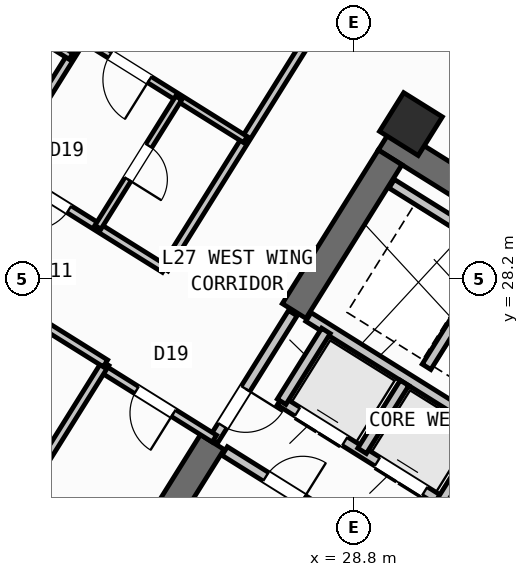
"""IFC4 building model, lengths in metres.
Left out: names, types, materials, properties, quantities, classifications, styles, units other than length and angle.
Written with IfcOpenShell. Run it as: python <this file> out.ifc"""

import sys

from ifc_helpers import new_model, si_unit, direction, frame, frame_2d, origin, origin_2d, place, context, subcontext, project, spatial, rectangle, hollow_rectangle, extrude, source, transform, mapped, element, fill, save


model = new_model("IFC4")
c1 = context("Model", 3, precision=1e-05, world=origin(), true_north=direction((0.0, 1.0)))
c2 = subcontext(c1, "Body", "Model", "MODEL_VIEW")
j1 = project(units=[si_unit("LENGTHUNIT", "METRE"), si_unit("PLANEANGLEUNIT", "RADIAN")], contexts=[c1])
p1 = place(None, origin())
s1 = spatial("IfcSite", under=j1, at=p1, CompositionType="ELEMENT")
p2 = place(p1, origin())
s2 = spatial("IfcBuilding", under=s1, at=p2, CompositionType="ELEMENT")
p3 = place(p2, frame((0.0, 0.0, 108.9)))
s3 = spatial("IfcBuildingStorey", under=s2, at=p3, CompositionType="ELEMENT", Elevation=108.9)
p4 = place(p3, frame((40.573, 24.01, 0.0), z_axis=(0.0, 0.0, 1.0), x_axis=(-0.848047359947, 0.529920442413, 0.0)))
e1 = element("IfcWall", 1, at=p4, inside=s3, PredefinedType="SHEAR", context=c2, shape_type="SweptSolid", body=[
    extrude(rectangle(XDim=13.14, YDim=0.55, at=frame_2d((6.57, 0.0))), origin(), (0.0, 0.0, 1.0), 3.35),
])
p5 = place(p3, frame((29.517, 30.594, 0.0), z_axis=(0.0, 0.0, 1.0), x_axis=(-0.529906864564, -0.848055844204, 0.0)))
e2 = element("IfcWall", 2, at=p5, inside=s3, PredefinedType="SHEAR", context=c2, shape_type="SweptSolid", body=[
    extrude(rectangle(XDim=3.575, YDim=0.55, at=frame_2d((1.788, 0.0))), origin(), (0.0, 0.0, 1.0), 3.35),
])
p6 = place(p3, frame((26.007, 24.976, 0.0), z_axis=(0.0, 0.0, 1.0), x_axis=(-0.529923795287, -0.848045264823, 0.0)))
e3 = element("IfcWall", 3, at=p6, inside=s3, PredefinedType="SHEAR", context=c2, shape_type="SweptSolid", body=[
    extrude(rectangle(XDim=6.425, YDim=0.55, at=frame_2d((3.212, 0.0))), origin(), (0.0, 0.0, 1.0), 3.35),
])
m1 = source(origin(), c2, "Body", "SweptSolid", [
    extrude(hollow_rectangle(XDim=0.9, YDim=0.9, WallThickness=0.036, at=origin_2d()), origin(), (0.0, 0.0, 1.0), 3.6),
])
p7 = place(p3, frame((29.928, 31.251, 0.0), z_axis=(0.0, 0.0, 1.0), x_axis=(-0.848048096156, 0.529919264233, 0.0)))
e4 = element("IfcColumn", 4, at=p7, inside=s3, PredefinedType="COLUMN", context=c2, shape_type="MappedRepresentation", body=[
    mapped(m1, transform((0.0, 0.0, 0.0), scale=1.0)),
])
p8 = place(p3, frame((31.76, 12.183, 0.0), z_axis=(0.0, 0.0, 1.0), x_axis=(-0.848047074256, 0.529920899612, 0.0)))
e5 = element("IfcWall", 5, at=p8, inside=s3, PredefinedType="STANDARD", context=c2, shape_type="SweptSolid", body=[
    extrude(rectangle(XDim=30.652, YDim=0.32, at=frame_2d((15.326, 0.0))), origin(), (0.0, 0.0, 1.0), 3.35),
])
p9 = place(p8, frame((15.153, 0.0, 0.0)))
e6 = element("IfcOpeningElement", 6, at=p9, cuts=e5, PredefinedType="OPENING", context=c2, shape_type="SweptSolid", body=[
    extrude(rectangle(XDim=1.2, YDim=2.15, at=frame_2d((0.6, 1.075))), frame((0.0, 0.17, 0.0), z_axis=(0.0, -1.0, 0.0), x_axis=(1.0, 0.0, 0.0)), (0.0, 0.0, 1.0), 0.34),
])
p10 = place(p8, frame((2.002, 0.0, 0.8)))
e7 = element("IfcOpeningElement", 7, at=p10, cuts=e5, PredefinedType="OPENING", context=c2, shape_type="SweptSolid", body=[
    extrude(rectangle(XDim=2.1, YDim=1.55, at=frame_2d((1.05, 0.775))), frame((0.0, 0.17, 0.0), z_axis=(0.0, -1.0, 0.0), x_axis=(1.0, 0.0, 0.0)), (0.0, 0.0, 1.0), 0.34),
])
p11 = place(p8, frame((7.206, 0.0, 0.8)))
e8 = element("IfcOpeningElement", 8, at=p11, cuts=e5, PredefinedType="OPENING", context=c2, shape_type="SweptSolid", body=[
    extrude(rectangle(XDim=2.1, YDim=1.55, at=frame_2d((1.05, 0.775))), frame((0.0, 0.17, 0.0), z_axis=(0.0, -1.0, 0.0), x_axis=(1.0, 0.0, 0.0)), (0.0, 0.0, 1.0), 0.34),
])
p12 = place(p8, frame((12.648, 0.0, 1.0)))
e9 = element("IfcOpeningElement", 9, at=p12, cuts=e5, PredefinedType="OPENING", context=c2, shape_type="SweptSolid", body=[
    extrude(rectangle(XDim=0.9, YDim=1.25, at=frame_2d((0.45, 0.625))), frame((0.0, 0.17, 0.0), z_axis=(0.0, -1.0, 0.0), x_axis=(1.0, 0.0, 0.0)), (0.0, 0.0, 1.0), 0.34),
])
p13 = place(p8, frame((19.59, 0.0, 0.95)))
e10 = element("IfcOpeningElement", 10, at=p13, cuts=e5, PredefinedType="OPENING", context=c2, shape_type="SweptSolid", body=[
    extrude(rectangle(XDim=1.2, YDim=1.4, at=frame_2d((0.6, 0.7))), frame((0.0, 0.17, 0.0), z_axis=(0.0, -1.0, 0.0), x_axis=(1.0, 0.0, 0.0)), (0.0, 0.0, 1.0), 0.34),
])
p14 = place(p8, frame((25.966, 0.0, 1.0)))
e11 = element("IfcOpeningElement", 11, at=p14, cuts=e5, PredefinedType="OPENING", context=c2, shape_type="SweptSolid", body=[
    extrude(rectangle(XDim=0.9, YDim=1.25, at=frame_2d((0.45, 0.625))), frame((0.0, 0.17, 0.0), z_axis=(0.0, -1.0, 0.0), x_axis=(1.0, 0.0, 0.0)), (0.0, 0.0, 1.0), 0.34),
])
p15 = place(p8, frame((28.871, 0.0, 1.0)))
e12 = element("IfcOpeningElement", 12, at=p15, cuts=e5, PredefinedType="OPENING", context=c2, shape_type="SweptSolid", body=[
    extrude(rectangle(XDim=0.9, YDim=1.25, at=frame_2d((0.45, 0.625))), frame((0.0, 0.17, 0.0), z_axis=(0.0, -1.0, 0.0), x_axis=(1.0, 0.0, 0.0)), (0.0, 0.0, 1.0), 0.34),
])
p16 = place(p3, frame((17.424, 47.083, 0.0), z_axis=(0.0, 0.0, 1.0), x_axis=(0.848049927979, -0.529916332693, 0.0)))
e13 = element("IfcWall", 13, at=p16, inside=s3, PredefinedType="STANDARD", context=c2, shape_type="SweptSolid", body=[
    extrude(rectangle(XDim=29.223, YDim=0.32, at=frame_2d((14.612, 0.0))), origin(), (0.0, 0.0, 1.0), 3.35),
])
p17 = place(p16, frame((3.77, 0.0, 0.0)))
e14 = element("IfcOpeningElement", 14, at=p17, cuts=e13, PredefinedType="OPENING", context=c2, shape_type="SweptSolid", body=[
    extrude(rectangle(XDim=1.05, YDim=2.15, at=frame_2d((0.525, 1.075))), frame((0.0, 0.17, 0.0), z_axis=(0.0, -1.0, 0.0), x_axis=(1.0, 0.0, 0.0)), (0.0, 0.0, 1.0), 0.34),
])
p18 = place(p16, frame((0.9, 0.0, 0.8)))
e15 = element("IfcOpeningElement", 15, at=p18, cuts=e13, PredefinedType="OPENING", context=c2, shape_type="SweptSolid", body=[
    extrude(rectangle(XDim=2.1, YDim=1.55, at=frame_2d((1.05, 0.775))), frame((0.0, 0.17, 0.0), z_axis=(0.0, -1.0, 0.0), x_axis=(1.0, 0.0, 0.0)), (0.0, 0.0, 1.0), 0.34),
])
p19 = place(p16, frame((6.972, 0.0, 1.0)))
e16 = element("IfcOpeningElement", 16, at=p19, cuts=e13, PredefinedType="OPENING", context=c2, shape_type="SweptSolid", body=[
    extrude(rectangle(XDim=0.9, YDim=1.25, at=frame_2d((0.45, 0.625))), frame((0.0, 0.17, 0.0), z_axis=(0.0, -1.0, 0.0), x_axis=(1.0, 0.0, 0.0)), (0.0, 0.0, 1.0), 0.34),
])
p20 = place(p16, frame((9.847, 0.0, 0.85)))
e17 = element("IfcOpeningElement", 17, at=p20, cuts=e13, PredefinedType="OPENING", context=c2, shape_type="SweptSolid", body=[
    extrude(rectangle(XDim=1.5, YDim=1.5, at=frame_2d((0.75, 0.75))), frame((0.0, 0.17, 0.0), z_axis=(0.0, -1.0, 0.0), x_axis=(1.0, 0.0, 0.0)), (0.0, 0.0, 1.0), 0.34),
])
p21 = place(p16, frame((13.889, 0.0, 0.95)))
e18 = element("IfcOpeningElement", 18, at=p21, cuts=e13, PredefinedType="OPENING", context=c2, shape_type="SweptSolid", body=[
    extrude(rectangle(XDim=1.2, YDim=1.4, at=frame_2d((0.6, 0.7))), frame((0.0, 0.17, 0.0), z_axis=(0.0, -1.0, 0.0), x_axis=(1.0, 0.0, 0.0)), (0.0, 0.0, 1.0), 0.34),
])
p22 = place(p16, frame((17.254, 0.0, 1.0)))
e19 = element("IfcOpeningElement", 19, at=p22, cuts=e13, PredefinedType="OPENING", context=c2, shape_type="SweptSolid", body=[
    extrude(rectangle(XDim=0.9, YDim=1.25, at=frame_2d((0.45, 0.625))), frame((0.0, 0.17, 0.0), z_axis=(0.0, -1.0, 0.0), x_axis=(1.0, 0.0, 0.0)), (0.0, 0.0, 1.0), 0.34),
])
p23 = place(p16, frame((20.764, 0.0, 0.8)))
e20 = element("IfcOpeningElement", 20, at=p23, cuts=e13, PredefinedType="OPENING", context=c2, shape_type="SweptSolid", body=[
    extrude(rectangle(XDim=2.1, YDim=1.55, at=frame_2d((1.05, 0.775))), frame((0.0, 0.17, 0.0), z_axis=(0.0, -1.0, 0.0), x_axis=(1.0, 0.0, 0.0)), (0.0, 0.0, 1.0), 0.34),
])
p24 = place(p16, frame((25.403, 0.0, 0.8)))
e21 = element("IfcOpeningElement", 21, at=p24, cuts=e13, PredefinedType="OPENING", context=c2, shape_type="SweptSolid", body=[
    extrude(rectangle(XDim=2.1, YDim=1.55, at=frame_2d((1.05, 0.775))), frame((0.0, 0.17, 0.0), z_axis=(0.0, -1.0, 0.0), x_axis=(1.0, 0.0, 0.0)), (0.0, 0.0, 1.0), 0.34),
])
p25 = place(p3, frame((31.822, 24.998, 0.0), z_axis=(0.0, 0.0, 1.0), x_axis=(-0.848036912365, 0.52993716162, 0.0)))
e22 = element("IfcWall", 22, at=p25, inside=s3, PredefinedType="STANDARD", context=c2, shape_type="SweptSolid", body=[
    extrude(rectangle(XDim=4.618, YDim=0.2, at=frame_2d((2.309, 0.0))), origin(), (0.0, 0.0, 1.0), 3.34),
])
p26 = place(p3, frame((32.108, 22.814, 0.0), z_axis=(0.0, 0.0, 1.0), x_axis=(-0.848042229521, 0.529928652696, 0.0)))
e23 = element("IfcWall", 23, at=p26, inside=s3, PredefinedType="STANDARD", context=c2, shape_type="SweptSolid", body=[
    extrude(rectangle(XDim=5.62, YDim=0.2, at=frame_2d((2.81, 0.0))), origin(), (0.0, 0.0, 1.0), 3.34),
])
p27 = place(p26, frame((0.39, 0.0, 0.0)))
e24 = element("IfcOpeningElement", 24, at=p27, cuts=e23, PredefinedType="OPENING", context=c2, shape_type="SweptSolid", body=[
    extrude(rectangle(XDim=1.1, YDim=2.15, at=frame_2d((0.55, 1.075))), frame((0.0, 0.11, 0.0), z_axis=(0.0, -1.0, 0.0), x_axis=(1.0, 0.0, 0.0)), (0.0, 0.0, 1.0), 0.22),
])
p28 = place(p26, frame((2.25, 0.0, 0.0)))
e25 = element("IfcOpeningElement", 25, at=p28, cuts=e23, PredefinedType="OPENING", context=c2, shape_type="SweptSolid", body=[
    extrude(rectangle(XDim=1.1, YDim=2.15, at=frame_2d((0.55, 1.075))), frame((0.0, 0.11, 0.0), z_axis=(0.0, -1.0, 0.0), x_axis=(1.0, 0.0, 0.0)), (0.0, 0.0, 1.0), 0.22),
])
p29 = place(p26, frame((4.11, 0.0, 0.0)))
e26 = element("IfcOpeningElement", 26, at=p29, cuts=e23, PredefinedType="OPENING", context=c2, shape_type="SweptSolid", body=[
    extrude(rectangle(XDim=1.1, YDim=2.15, at=frame_2d((0.55, 1.075))), frame((0.0, 0.11, 0.0), z_axis=(0.0, -1.0, 0.0), x_axis=(1.0, 0.0, 0.0)), (0.0, 0.0, 1.0), 0.22),
])
p30 = place(p3, frame((28.25, 27.17, 0.0), z_axis=(0.0, 0.0, 1.0), x_axis=(-0.529905827651, -0.848056492117, 0.0)))
e27 = element("IfcWall", 27, at=p30, inside=s3, PredefinedType="STANDARD", context=c2, shape_type="SweptSolid", body=[
    extrude(rectangle(XDim=1.65, YDim=0.2, at=frame_2d((0.825, 0.0))), origin(), (0.0, 0.0, 1.0), 3.34),
])
p31 = place(p3, frame((31.645, 28.716, 0.0), z_axis=(0.0, 0.0, 1.0), x_axis=(-0.52986693015, -0.848080795876, 0.0)))
e28 = element("IfcWall", 28, at=p31, inside=s3, PredefinedType="STANDARD", context=c2, shape_type="SweptSolid", body=[
    extrude(rectangle(XDim=2.66, YDim=0.2, at=frame_2d((1.33, 0.0))), origin(), (0.0, 0.0, 1.0), 3.34),
])
p32 = place(p3, frame((33.363, 27.69, 0.0), z_axis=(0.0, 0.0, 1.0), x_axis=(-0.848047090064, 0.529920874315, 0.0)))
e29 = element("IfcWall", 29, at=p32, inside=s3, PredefinedType="STANDARD", context=c2, shape_type="SweptSolid", body=[
    extrude(rectangle(XDim=4.498, YDim=0.2, at=frame_2d((2.249, 0.0))), origin(), (0.0, 0.0, 1.0), 3.34),
])
for number, where, z_axis, x_axis in (
    (30, (31.379, 25.156, 0.0), (0.0, 0.0, 1.0), (-0.53, -0.848, 0.0)),
    (31, (29.801, 26.142, 0.0), (0.0, 0.0, 1.0), (-0.53, -0.848, 0.0)),
):
    element("IfcWall", number, at=place(p3, frame(where, z_axis=z_axis, x_axis=x_axis)), inside=s3, PredefinedType="STANDARD", context=c2, shape_type="SweptSolid", body=[
        extrude(rectangle(XDim=1.58, YDim=0.2, at=frame_2d((0.79, 0.0))), origin(), (0.0, 0.0, 1.0), 3.34),
    ])
p33 = place(p3, frame((31.525, 21.504, 0.0), z_axis=(0.0, 0.0, 1.0), x_axis=(-0.848040211232, 0.529931882541, 0.0)))
e32 = element("IfcWall", 32, at=p33, inside=s3, PredefinedType="STANDARD", context=c2, shape_type="SweptSolid", body=[
    extrude(rectangle(XDim=6.218, YDim=0.2, at=frame_2d((3.109, 0.0))), origin(), (0.0, 0.0, 1.0), 3.34),
])
p34 = place(p33, frame((4.4, 0.0, 0.0)))
e33 = element("IfcOpeningElement", 33, at=p34, cuts=e32, PredefinedType="OPENING", context=c2, shape_type="SweptSolid", body=[
    extrude(rectangle(XDim=0.86, YDim=2.05, at=frame_2d((0.43, 1.025))), frame((0.0, 0.11, 0.0), z_axis=(0.0, -1.0, 0.0), x_axis=(1.0, 0.0, 0.0)), (0.0, 0.0, 1.0), 0.22),
])
p35 = place(p33, frame((0.35, 0.0, 0.0)))
e34 = element("IfcOpeningElement", 34, at=p35, cuts=e32, PredefinedType="OPENING", context=c2, shape_type="SweptSolid", body=[
    extrude(rectangle(XDim=0.86, YDim=2.05, at=frame_2d((0.43, 1.025))), frame((0.0, 0.11, 0.0), z_axis=(0.0, -1.0, 0.0), x_axis=(1.0, 0.0, 0.0)), (0.0, 0.0, 1.0), 0.22),
])
p36 = place(p3, frame((27.596, 27.52, 0.0), z_axis=(0.0, 0.0, 1.0), x_axis=(-0.529865479138, -0.848081702443, 0.0)))
e35 = element("IfcWall", 35, at=p36, inside=s3, PredefinedType="STANDARD", context=c2, shape_type="SweptSolid", body=[
    extrude(rectangle(XDim=2.96, YDim=0.2, at=frame_2d((1.48, 0.0))), origin(), (0.0, 0.0, 1.0), 3.34),
])
p37 = place(p36, frame((1.76, 0.0, 0.0)))
e36 = element("IfcOpeningElement", 36, at=p37, cuts=e35, PredefinedType="OPENING", context=c2, shape_type="SweptSolid", body=[
    extrude(rectangle(XDim=0.86, YDim=2.05, at=frame_2d((0.43, 1.025))), frame((0.0, 0.11, 0.0), z_axis=(0.0, -1.0, 0.0), x_axis=(1.0, 0.0, 0.0)), (0.0, 0.0, 1.0), 0.22),
])
p38 = place(p3, frame((26.049, 25.044, 0.0), z_axis=(0.0, 0.0, 1.0), x_axis=(-0.848050851465, 0.529914854792, 0.0)))
e37 = element("IfcWall", 37, at=p38, inside=s3, PredefinedType="PARTITIONING", context=c2, shape_type="SweptSolid", body=[
    extrude(rectangle(XDim=2.61, YDim=0.16, at=frame_2d((1.305, 0.0))), origin(), (0.0, 0.0, 1.0), 2.775),
])
p39 = place(p38, frame((0.95, 0.0, 0.0)))
e38 = element("IfcOpeningElement", 38, at=p39, cuts=e37, PredefinedType="OPENING", context=c2, shape_type="SweptSolid", body=[
    extrude(rectangle(XDim=0.86, YDim=2.05, at=frame_2d((0.43, 1.025))), frame((0.0, 0.09, 0.0), z_axis=(0.0, -1.0, 0.0), x_axis=(1.0, 0.0, 0.0)), (0.0, 0.0, 1.0), 0.18),
])
p40 = place(p3, frame((31.239, 38.274, 0.0), z_axis=(0.0, 0.0, 1.0), x_axis=(-0.529925472745, -0.848044216616, 0.0)))
e39 = element("IfcWall", 39, at=p40, inside=s3, PredefinedType="PARTITIONING", context=c2, shape_type="SweptSolid", body=[
    extrude(rectangle(XDim=11.65, YDim=0.16, at=frame_2d((5.825, 0.0))), origin(), (0.0, 0.0, 1.0), 3.34),
])
p41 = place(p3, frame((23.899, 26.529, 0.0), z_axis=(0.0, 0.0, 1.0), x_axis=(-0.529920662441, -0.848047222457, 0.0)))
e40 = element("IfcWall", 40, at=p41, inside=s3, PredefinedType="PARTITIONING", context=c2, shape_type="SweptSolid", body=[
    extrude(rectangle(XDim=7.85, YDim=0.16, at=frame_2d((3.925, 0.0))), origin(), (0.0, 0.0, 1.0), 3.34),
])
p42 = place(p3, frame((25.065, 28.394, 0.0), z_axis=(0.0, 0.0, 1.0), x_axis=(-0.848048310262, 0.529918921593, 0.0)))
e41 = element("IfcWall", 41, at=p42, inside=s3, PredefinedType="PARTITIONING", context=c2, shape_type="SweptSolid", body=[
    extrude(rectangle(XDim=16.73, YDim=0.16, at=frame_2d((8.365, 0.0))), origin(), (0.0, 0.0, 1.0), 3.34),
])
p43 = place(p42, frame((2.22, 0.0, 0.0)))
e42 = element("IfcOpeningElement", 42, at=p43, cuts=e41, PredefinedType="OPENING", context=c2, shape_type="SweptSolid", body=[
    extrude(rectangle(XDim=0.86, YDim=2.05, at=frame_2d((0.43, 1.025))), frame((0.0, 0.09, 0.0), z_axis=(0.0, -1.0, 0.0), x_axis=(1.0, 0.0, 0.0)), (0.0, 0.0, 1.0), 0.18),
])
p44 = place(p42, frame((7.82, 0.0, 0.0)))
e43 = element("IfcOpeningElement", 43, at=p44, cuts=e41, PredefinedType="OPENING", context=c2, shape_type="SweptSolid", body=[
    extrude(rectangle(XDim=1.0, YDim=2.1, at=frame_2d((0.5, 1.05))), frame((0.0, 0.09, 0.0), z_axis=(0.0, -1.0, 0.0), x_axis=(1.0, 0.0, 0.0)), (0.0, 0.0, 1.0), 0.18),
])
p45 = place(p42, frame((12.95, 0.0, 0.0)))
e44 = element("IfcOpeningElement", 44, at=p45, cuts=e41, PredefinedType="OPENING", context=c2, shape_type="SweptSolid", body=[
    extrude(rectangle(XDim=1.0, YDim=2.1, at=frame_2d((0.5, 1.05))), frame((0.0, 0.09, 0.0), z_axis=(0.0, -1.0, 0.0), x_axis=(1.0, 0.0, 0.0)), (0.0, 0.0, 1.0), 0.18),
])
p46 = place(p3, frame((23.899, 26.529, 0.0), z_axis=(0.0, 0.0, 1.0), x_axis=(-0.848064240775, 0.529893426567, 0.0)))
e45 = element("IfcWall", 45, at=p46, inside=s3, PredefinedType="PARTITIONING", context=c2, shape_type="SweptSolid", body=[
    extrude(rectangle(XDim=3.328, YDim=0.16, at=frame_2d((1.664, 0.0))), origin(), (0.0, 0.0, 1.0), 2.775),
])
p47 = place(p46, frame((1.395, 0.0, 0.0)))
e46 = element("IfcOpeningElement", 46, at=p47, cuts=e45, PredefinedType="OPENING", context=c2, shape_type="SweptSolid", body=[
    extrude(rectangle(XDim=1.0, YDim=2.1, at=frame_2d((0.5, 1.05))), frame((0.0, 0.09, 0.0), z_axis=(0.0, -1.0, 0.0), x_axis=(1.0, 0.0, 0.0)), (0.0, 0.0, 1.0), 0.18),
])
p48 = place(p3, frame((24.256, 34.251, 0.0), z_axis=(0.0, 0.0, 1.0), x_axis=(-0.529926399231, -0.848043637673, 0.0)))
e47 = element("IfcWall", 47, at=p48, inside=s3, PredefinedType="PARTITIONING", context=c2, shape_type="SweptSolid", body=[
    extrude(rectangle(XDim=4.538, YDim=0.16, at=frame_2d((2.269, 0.0))), origin(), (0.0, 0.0, 1.0), 2.775),
])
p49 = place(p3, frame((26.66, 30.947, 0.0), z_axis=(0.0, 0.0, 1.0), x_axis=(-0.84803087207, 0.529946827537, 0.0)))
e48 = element("IfcWall", 48, at=p49, inside=s3, PredefinedType="PLUMBINGWALL", context=c2, shape_type="SweptSolid", body=[
    extrude(rectangle(XDim=3.79, YDim=0.14, at=frame_2d((1.895, 0.0))), origin(), (0.0, 0.0, 1.0), 3.34),
])
p50 = place(p49, frame((2.23, 0.0, 0.0)))
e49 = element("IfcOpeningElement", 49, at=p50, cuts=e48, PredefinedType="OPENING", context=c2, shape_type="SweptSolid", body=[
    extrude(rectangle(XDim=0.92, YDim=2.08, at=frame_2d((0.46, 1.04))), frame((0.0, 0.08, 0.0), z_axis=(0.0, -1.0, 0.0), x_axis=(1.0, 0.0, 0.0)), (0.0, 0.0, 1.0), 0.16),
])
p51 = place(p3, frame((25.345, 31.768, 0.0), z_axis=(0.0, 0.0, 1.0), x_axis=(-0.529882284462, -0.848071202561, 0.0)))
e50 = element("IfcWall", 50, at=p51, inside=s3, PredefinedType="PLUMBINGWALL", context=c2, shape_type="SweptSolid", body=[
    extrude(rectangle(XDim=3.01, YDim=0.14, at=frame_2d((1.505, 0.0))), origin(), (0.0, 0.0, 1.0), 2.995),
])
p52 = place(p51, frame((1.115, 0.0, 0.0)))
e51 = element("IfcOpeningElement", 51, at=p52, cuts=e50, PredefinedType="OPENING", context=c2, shape_type="SweptSolid", body=[
    extrude(rectangle(XDim=0.78, YDim=2.05, at=frame_2d((0.39, 1.025))), frame((0.0, 0.08, 0.0), z_axis=(0.0, -1.0, 0.0), x_axis=(1.0, 0.0, 0.0)), (0.0, 0.0, 1.0), 0.16),
])
p53 = place(p3, frame((23.218, 32.591, 0.0), z_axis=(0.0, 0.0, 1.0), x_axis=(-0.848056163074, 0.529906354247, 0.0)))
e52 = element("IfcWall", 52, at=p53, inside=s3, PredefinedType="PLUMBINGWALL", context=c2, shape_type="SweptSolid", body=[
    extrude(rectangle(XDim=6.4, YDim=0.14, at=frame_2d((3.2, 0.0))), origin(), (0.0, 0.0, 1.0), 3.34),
])
p54 = place(p53, frame((2.824, 0.0, 0.0)))
e53 = element("IfcOpeningElement", 53, at=p54, cuts=e52, PredefinedType="OPENING", context=c2, shape_type="SweptSolid", body=[
    extrude(rectangle(XDim=0.78, YDim=2.05, at=frame_2d((0.39, 1.025))), frame((0.0, 0.08, 0.0), z_axis=(0.0, -1.0, 0.0), x_axis=(1.0, 0.0, 0.0)), (0.0, 0.0, 1.0), 0.16),
])
p55 = place(p3, frame((41.936, 26.012, 0.0), z_axis=(0.0, 0.0, 1.0), x_axis=(-0.848051154596, 0.529914369676, 0.0)))
e54 = element("IfcWall", 54, at=p55, inside=s3, PredefinedType="PARTITIONING", context=c2, shape_type="SweptSolid", body=[
    extrude(rectangle(XDim=15.57, YDim=0.16, at=frame_2d((7.785, 0.0))), origin(), (0.0, 0.0, 1.0), 3.34),
])
p56 = place(p55, frame((10.83, 0.0, 0.0)))
e55 = element("IfcOpeningElement", 55, at=p56, cuts=e54, PredefinedType="OPENING", context=c2, shape_type="SweptSolid", body=[
    extrude(rectangle(XDim=1.0, YDim=2.1, at=frame_2d((0.5, 1.05))), frame((0.0, 0.09, 0.0), z_axis=(0.0, -1.0, 0.0), x_axis=(1.0, 0.0, 0.0)), (0.0, 0.0, 1.0), 0.18),
])
p57 = place(p3, frame((42.226, 28.873, 0.0), z_axis=(0.0, 0.0, 1.0), x_axis=(-0.848049134363, 0.529917602752, 0.0)))
e56 = element("IfcWall", 56, at=p57, inside=s3, PredefinedType="PLUMBINGWALL", context=c2, shape_type="SweptSolid", body=[
    extrude(rectangle(XDim=14.3, YDim=0.14, at=frame_2d((7.15, 0.0))), origin(), (0.0, 0.0, 1.0), 3.34),
])
p58 = place(p57, frame((9.57, 0.0, 0.0)))
e57 = element("IfcOpeningElement", 57, at=p58, cuts=e56, PredefinedType="OPENING", context=c2, shape_type="SweptSolid", body=[
    extrude(rectangle(XDim=0.92, YDim=2.08, at=frame_2d((0.46, 1.04))), frame((0.0, 0.08, 0.0), z_axis=(0.0, -1.0, 0.0), x_axis=(1.0, 0.0, 0.0)), (0.0, 0.0, 1.0), 0.16),
])
m2 = source(origin(), c2, "Body", "SweptSolid", [
    extrude(rectangle(XDim=1.1, YDim=2.15, at=frame_2d((0.55, 1.075))), frame((0.0, 0.025, 0.0), z_axis=(0.0, -1.0, 0.0), x_axis=(1.0, 0.0, 0.0)), (0.0, 0.0, 1.0), 0.05),
])
p59 = place(p28, origin())
e58 = element("IfcDoor", 58, at=p59, inside=s3, OperationType="DOUBLE_DOOR_SLIDING", PredefinedType="DOOR", context=c2, shape_type="MappedRepresentation", body=[
    mapped(m2, transform((0.0, 0.0, 0.0), scale=1.0)),
])
fill(e25, e58)
p60 = place(p29, origin())
e59 = element("IfcDoor", 59, at=p60, inside=s3, OperationType="DOUBLE_DOOR_SLIDING", PredefinedType="DOOR", context=c2, shape_type="MappedRepresentation", body=[
    mapped(m2, transform((0.0, 0.0, 0.0), scale=1.0)),
])
fill(e26, e59)
m3 = source(origin(), c2, "Body", "SweptSolid", [
    extrude(rectangle(XDim=0.86, YDim=2.05, at=frame_2d((0.43, 1.025))), frame((0.0, 0.025, 0.0), z_axis=(0.0, -1.0, 0.0), x_axis=(1.0, 0.0, 0.0)), (0.0, 0.0, 1.0), 0.05),
])
p61 = place(p34, frame((0.86, 0.0, 0.0), z_axis=(0.0, 0.0, 1.0), x_axis=(-1.0, 0.0, 0.0)))
e60 = element("IfcDoor", 60, at=p61, inside=s3, OperationType="SINGLE_SWING_RIGHT", PredefinedType="DOOR", context=c2, shape_type="MappedRepresentation", body=[
    mapped(m3, transform((0.0, 0.0, 0.0), scale=1.0)),
])
fill(e33, e60)
p62 = place(p39, origin())
e61 = element("IfcDoor", 61, at=p62, inside=s3, OperationType="SINGLE_SWING_LEFT", PredefinedType="DOOR", context=c2, shape_type="MappedRepresentation", body=[
    mapped(m3, transform((0.0, 0.0, 0.0), scale=1.0)),
])
fill(e38, e61)
p63 = place(p37, origin())
e62 = element("IfcDoor", 62, at=p63, inside=s3, OperationType="SINGLE_SWING_LEFT", PredefinedType="DOOR", context=c2, shape_type="MappedRepresentation", body=[
    mapped(m3, transform((0.0, 0.0, 0.0), scale=1.0)),
])
fill(e36, e62)
p64 = place(p43, origin())
e63 = element("IfcDoor", 63, at=p64, inside=s3, OperationType="SINGLE_SWING_RIGHT", PredefinedType="DOOR", context=c2, shape_type="MappedRepresentation", body=[
    mapped(m3, transform((0.0, 0.0, 0.0), scale=1.0)),
])
fill(e42, e63)
m4 = source(origin(), c2, "Body", "SweptSolid", [
    extrude(rectangle(XDim=0.92, YDim=2.08, at=frame_2d((0.46, 1.04))), frame((0.0, 0.025, 0.0), z_axis=(0.0, -1.0, 0.0), x_axis=(1.0, 0.0, 0.0)), (0.0, 0.0, 1.0), 0.05),
])
p65 = place(p50, origin())
e64 = element("IfcDoor", 64, at=p65, inside=s3, OperationType="SINGLE_SWING_LEFT", PredefinedType="DOOR", context=c2, shape_type="MappedRepresentation", body=[
    mapped(m4, transform((0.0, 0.0, 0.0), scale=1.0)),
])
fill(e49, e64)
m5 = source(origin(), c2, "Body", "SweptSolid", [
    extrude(rectangle(XDim=0.78, YDim=2.05, at=frame_2d((0.39, 1.025))), frame((0.0, 0.025, 0.0), z_axis=(0.0, -1.0, 0.0), x_axis=(1.0, 0.0, 0.0)), (0.0, 0.0, 1.0), 0.05),
])
p66 = place(p52, origin())
e65 = element("IfcDoor", 65, at=p66, inside=s3, OperationType="SINGLE_SWING_RIGHT", PredefinedType="DOOR", context=c2, shape_type="MappedRepresentation", body=[
    mapped(m5, transform((0.0, 0.0, 0.0), scale=1.0)),
])
fill(e51, e65)
save(model, sys.argv[1])
